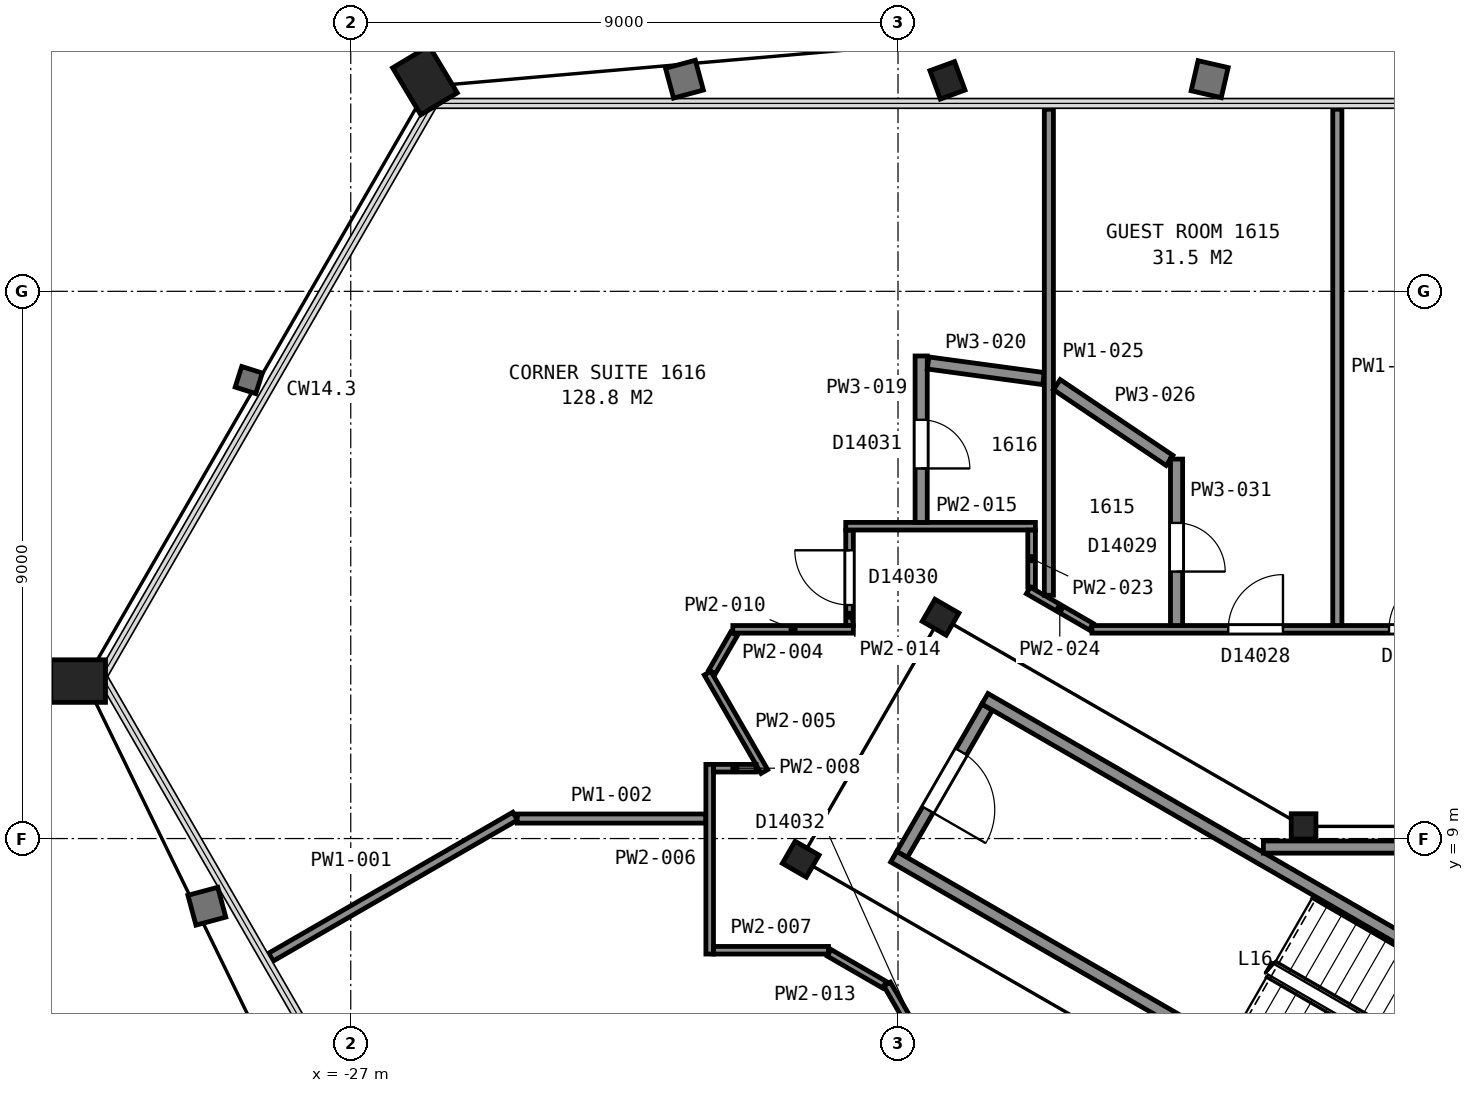
"""IFC4 building model, lengths in metres.
Left out: names, types, materials, properties, quantities, classifications, styles, units other than length and angle.
Written with IfcOpenShell. Run it as: python <this file> out.ifc"""

import sys

from ifc_helpers import new_model, si_unit, direction, frame, frame_2d, origin, origin_2d, place, context, subcontext, project, spatial, rectangle, hollow_rectangle, i_section, extrude, element, fill, save


model = new_model("IFC4")
c1 = context("Model", 3, precision=1e-05, world=origin(), true_north=direction((0.0, 1.0)))
c2 = subcontext(c1, "Body", "Model", "MODEL_VIEW")
j1 = project(units=[si_unit("LENGTHUNIT", "METRE"), si_unit("PLANEANGLEUNIT", "RADIAN")], contexts=[c1])
p1 = place(None, origin())
s1 = spatial("IfcSite", under=j1, at=p1, CompositionType="ELEMENT")
p2 = place(p1, origin())
s2 = spatial("IfcBuilding", under=s1, at=p2, CompositionType="ELEMENT")
p3 = place(p2, frame((0.0, 0.0, 72.8)))
s3 = spatial("IfcBuildingStorey", under=s2, at=p3, CompositionType="ELEMENT", Elevation=72.8)
p4 = place(p3, frame((-17.151, 21.372, 0.025), z_axis=(-0.030414757347, 0.083024067354, 0.996083303131), x_axis=(0.999533369763, -0.000291044086, 0.030544361571)))
e1 = element("IfcColumn", 1, at=p4, inside=s3, PredefinedType="COLUMN", context=c2, shape_type="SweptSolid", body=[
    extrude(i_section(OverallWidth=0.432, OverallDepth=0.498, WebThickness=0.056, FlangeThickness=0.089, FilletRadius=0.015, at=origin_2d()), origin(), (0.0, 0.0, 1.0), 3.564),
])
p5 = place(p3, frame((-25.722, 21.373, 0.04), z_axis=(-0.049772291919, 0.082976830634, 0.995307773774), x_axis=(0.499550777014, 0.86500147592, -0.047132449981)))
e2 = element("IfcColumn", 2, at=p5, inside=s3, PredefinedType="COLUMN", context=c2, shape_type="SweptSolid", body=[
    extrude(hollow_rectangle(XDim=0.7, YDim=0.9, WallThickness=0.065, at=origin_2d()), origin(), (0.0, 0.0, 1.0), 3.537),
])
p6 = place(p3, frame((-31.374, 11.59, 0.04), z_axis=(-0.094046562862, 0.0, 0.995567799808), x_axis=(0.499442771107, 0.865061250551, 0.047179987117)))
e3 = element("IfcColumn", 3, at=p6, inside=s3, PredefinedType="COLUMN", context=c2, shape_type="SweptSolid", body=[
    extrude(hollow_rectangle(XDim=0.7, YDim=0.9, WallThickness=0.065, at=origin_2d()), origin(), (0.0, 0.0, 1.0), 3.536),
])
p7 = place(p3, frame((-11.33, 9.2, 0.0), z_axis=(0.0, 0.0, 1.0), x_axis=(1.0, 0.0, 0.0)))
e4 = element("IfcColumn", 4, at=p7, inside=s3, PredefinedType="COLUMN", context=c2, shape_type="SweptSolid", body=[
    extrude(i_section(OverallWidth=0.406, OverallDepth=0.417, WebThickness=0.03, FlangeThickness=0.048, FilletRadius=0.015, at=origin_2d()), origin(), (0.0, 0.0, 1.0), 3.6),
])
for number, where, z_axis, x_axis in (
    (5, (-17.3, 12.64, 0.0), (0.0, 0.0, 1.0), (0.5, 0.866, 0.0)),
    (6, (-19.6, 8.66, 0.0), (0.0, 0.0, 1.0), (0.5, 0.866, 0.0)),
):
    element("IfcColumn", number, at=place(p3, frame(where, z_axis=z_axis, x_axis=x_axis)), inside=s3, PredefinedType="COLUMN", context=c2, shape_type="SweptSolid", body=[
        extrude(i_section(OverallWidth=0.419, OverallDepth=0.455, WebThickness=0.042, FlangeThickness=0.068, FilletRadius=0.015, at=origin_2d()), origin(), (0.0, 0.0, 1.0), 3.6),
    ])
p8 = place(p3, frame((-16.534, 11.162, 0.0), z_axis=(0.0, 0.0, 1.0), x_axis=(-0.49998411664, -0.866034573852, 0.0)))
e7 = element("IfcWall", 7, at=p8, inside=s3, PredefinedType="PARTITIONING", context=c2, shape_type="SweptSolid", body=[
    extrude(rectangle(XDim=2.8, YDim=0.2, at=frame_2d((1.4, 0.0))), origin(), (0.0, 0.0, 1.0), 3.35),
])
p9 = place(p8, frame((0.85, 0.0, 0.0)))
e8 = element("IfcOpeningElement", 8, at=p9, cuts=e7, PredefinedType="OPENING", context=c2, shape_type="SweptSolid", body=[
    extrude(rectangle(XDim=1.1, YDim=2.1, at=frame_2d((0.55, 1.05))), frame((0.0, 0.11, 0.0), z_axis=(0.0, -1.0, 0.0), x_axis=(1.0, 0.0, 0.0)), (0.0, 0.0, 1.0), 0.22),
])
for number, where, z_axis, x_axis in (
    (9, (-7.678, 2.701, 0.0), (0.0, 0.0, 1.0), (-0.866, 0.5, 0.0)),
    (10, (-6.178, 5.299, 0.0), (0.0, 0.0, 1.0), (-0.866, 0.5, 0.0)),
):
    element("IfcWall", number, at=place(p3, frame(where, z_axis=z_axis, x_axis=x_axis)), inside=s3, PredefinedType="PARTITIONING", context=c2, shape_type="SweptSolid", body=[
        extrude(rectangle(XDim=12.0, YDim=0.2, at=frame_2d((6.0, 0.0))), origin(), (0.0, 0.0, 1.0), 3.35),
    ])
p10 = place(p3, frame((0.263, 8.86, 0.0), z_axis=(0.0, 0.0, 1.0), x_axis=(-1.0, 0.0, 0.0)))
e11 = element("IfcWall", 11, at=p10, inside=s3, PredefinedType="PARTITIONING", context=c2, shape_type="SweptSolid", body=[
    extrude(rectangle(XDim=12.254, YDim=0.2, at=frame_2d((6.127, 0.0))), origin(), (0.0, 0.0, 1.0), 3.35),
])
p11 = place(p10, frame((5.709, 0.0, 0.0)))
e12 = element("IfcOpeningElement", 12, at=p11, cuts=e11, PredefinedType="OPENING", context=c2, shape_type="SweptSolid", body=[
    extrude(rectangle(XDim=1.8, YDim=2.1, at=frame_2d((0.9, 1.05))), frame((0.0, 0.11, 0.0), z_axis=(0.0, -1.0, 0.0), x_axis=(1.0, 0.0, 0.0)), (0.0, 0.0, 1.0), 0.22),
])
p12 = place(p3, frame((-28.313, 7.05, 0.0), z_axis=(0.0, 0.0, 1.0), x_axis=(0.866076865069, 0.499910855846, 0.0)))
e13 = element("IfcWall", 13, at=p12, inside=s3, PredefinedType="PARTITIONING", context=c2, shape_type="SweptSolid", body=[
    extrude(rectangle(XDim=4.636, YDim=0.15, at=frame_2d((2.318, 0.0))), origin(), (0.0, 0.0, 1.0), 2.613),
])
p13 = place(p3, frame((-24.262, 9.329, 0.0), z_axis=(0.0, 0.0, 1.0), x_axis=(1.0, 0.0, 0.0)))
e14 = element("IfcWall", 14, at=p13, inside=s3, PredefinedType="PARTITIONING", context=c2, shape_type="SweptSolid", body=[
    extrude(rectangle(XDim=3.103, YDim=0.15, at=frame_2d((1.551, 0.0))), origin(), (0.0, 0.0, 1.0), 2.613),
])
p14 = place(p3, frame((-21.059, 11.741, 0.0), z_axis=(0.0, 0.0, 1.0), x_axis=(0.500238258503, 0.865887801468, 0.0)))
e15 = element("IfcWall", 15, at=p14, inside=s3, PredefinedType="PARTITIONING", context=c2, shape_type="SweptSolid", body=[
    extrude(rectangle(XDim=0.724, YDim=0.125, at=frame_2d((0.362, 0.0))), origin(), (0.0, 0.0, 1.0), 2.613),
])
p15 = place(p3, frame((-21.132, 11.721, 0.0), z_axis=(0.0, 0.0, 1.0), x_axis=(0.500072997275, -0.865983254686, 0.0)))
e16 = element("IfcWall", 16, at=p15, inside=s3, PredefinedType="PARTITIONING", context=c2, shape_type="SweptSolid", body=[
    extrude(rectangle(XDim=1.869, YDim=0.125, at=frame_2d((0.935, 0.0))), origin(), (0.0, 0.0, 1.0), 2.613),
])
p16 = place(p3, frame((-21.097, 7.101, 0.0), z_axis=(0.0, 0.0, 1.0), x_axis=(0.0, 1.0, 0.0)))
e17 = element("IfcWall", 17, at=p16, inside=s3, PredefinedType="PARTITIONING", context=c2, shape_type="SweptSolid", body=[
    extrude(rectangle(XDim=3.119, YDim=0.125, at=frame_2d((1.56, 0.0))), origin(), (0.0, 0.0, 1.0), 2.613),
])
p17 = place(p3, frame((-21.032, 7.163, 0.0), z_axis=(0.0, 0.0, 1.0), x_axis=(1.0, 0.0, 0.0)))
e18 = element("IfcWall", 18, at=p17, inside=s3, PredefinedType="PARTITIONING", context=c2, shape_type="SweptSolid", body=[
    extrude(rectangle(XDim=1.888, YDim=0.125, at=frame_2d((0.944, 0.0))), origin(), (0.0, 0.0, 1.0), 2.613),
])
p18 = place(p3, frame((-21.032, 10.157, 0.0), z_axis=(0.0, 0.0, 1.0), x_axis=(1.0, 0.0, 0.0)))
e19 = element("IfcWall", 19, at=p18, inside=s3, PredefinedType="PARTITIONING", context=c2, shape_type="SweptSolid", body=[
    extrude(rectangle(XDim=0.698, YDim=0.125, at=frame_2d((0.349, 0.0))), origin(), (0.0, 0.0, 1.0), 2.613),
])
p19 = place(p3, frame((-20.717, 12.441, 0.0), z_axis=(0.0, 0.0, 1.0), x_axis=(1.0, 0.0, 0.0)))
e20 = element("IfcWall", 20, at=p19, inside=s3, PredefinedType="PARTITIONING", context=c2, shape_type="SweptSolid", body=[
    extrude(rectangle(XDim=1.982, YDim=0.125, at=frame_2d((0.991, 0.0))), origin(), (0.0, 0.0, 1.0), 2.613),
])
p20 = place(p3, frame((-19.132, 7.121, 0.0), z_axis=(0.0, 0.0, 1.0), x_axis=(0.865876245925, -0.500258260045, 0.0)))
e21 = element("IfcWall", 21, at=p20, inside=s3, PredefinedType="PARTITIONING", context=c2, shape_type="SweptSolid", body=[
    extrude(rectangle(XDim=1.052, YDim=0.125, at=frame_2d((0.526, 0.0))), origin(), (0.0, 0.0, 1.0), 2.613),
])
p21 = place(p3, frame((-18.797, 12.506, 0.0), z_axis=(0.0, 0.0, 1.0), x_axis=(0.0, 1.0, 0.0)))
e22 = element("IfcWall", 22, at=p21, inside=s3, PredefinedType="PARTITIONING", context=c2, shape_type="SweptSolid", body=[
    extrude(rectangle(XDim=1.566, YDim=0.125, at=frame_2d((0.783, 0.0))), origin(), (0.0, 0.0, 1.0), 2.613),
])
p22 = place(p21, frame((0.335, 0.0, 0.0)))
e23 = element("IfcOpeningElement", 23, at=p22, cuts=e22, PredefinedType="OPENING", context=c2, shape_type="SweptSolid", body=[
    extrude(rectangle(XDim=0.9, YDim=2.1, at=frame_2d((0.45, 1.05))), frame((0.0, 0.073, 0.0), z_axis=(0.0, -1.0, 0.0), x_axis=(1.0, 0.0, 0.0)), (0.0, 0.0, 1.0), 0.145),
])
p23 = place(p3, frame((-18.86, 14.137, 0.0), z_axis=(0.0, 0.0, 1.0), x_axis=(1.0, 0.0, 0.0)))
e24 = element("IfcWall", 24, at=p23, inside=s3, PredefinedType="PARTITIONING", context=c2, shape_type="SweptSolid", body=[
    extrude(rectangle(XDim=3.119, YDim=0.125, at=frame_2d((1.56, 0.0))), origin(), (0.0, 0.0, 1.0), 2.613),
])
p24 = place(p3, frame((-3.766, -18.358, 0.0), z_axis=(0.0, 0.0, 1.0), x_axis=(-0.500003973642, 0.866023109589, 0.0)))
e25 = element("IfcWall", 25, at=p24, inside=s3, PredefinedType="PARTITIONING", context=c2, shape_type="SweptSolid", body=[
    extrude(rectangle(XDim=28.826, YDim=0.125, at=frame_2d((14.413, 0.0))), origin(), (0.0, 0.0, 1.0), 2.613),
])
p25 = place(p24, frame((27.114, 0.0, 0.0)))
e26 = element("IfcOpeningElement", 26, at=p25, cuts=e25, PredefinedType="OPENING", context=c2, shape_type="SweptSolid", body=[
    extrude(rectangle(XDim=0.9, YDim=2.1, at=frame_2d((0.45, 1.05))), frame((0.0, 0.073, 0.0), z_axis=(0.0, -1.0, 0.0), x_axis=(1.0, 0.0, 0.0)), (0.0, 0.0, 1.0), 0.145),
])
p26 = place(p24, frame((20.322, 0.0, 0.0)))
e27 = element("IfcOpeningElement", 27, at=p26, cuts=e25, PredefinedType="OPENING", context=c2, shape_type="SweptSolid", body=[
    extrude(rectangle(XDim=0.9, YDim=2.1, at=frame_2d((0.45, 1.05))), frame((0.0, 0.073, 0.0), z_axis=(0.0, -1.0, 0.0), x_axis=(1.0, 0.0, 0.0)), (0.0, 0.0, 1.0), 0.145),
])
p27 = place(p24, frame((17.68, 0.0, 0.0)))
e28 = element("IfcOpeningElement", 28, at=p27, cuts=e25, PredefinedType="OPENING", context=c2, shape_type="SweptSolid", body=[
    extrude(rectangle(XDim=0.9, YDim=2.1, at=frame_2d((0.45, 1.05))), frame((0.0, 0.073, 0.0), z_axis=(0.0, -1.0, 0.0), x_axis=(1.0, 0.0, 0.0)), (0.0, 0.0, 1.0), 0.145),
])
p28 = place(p24, frame((10.836, 0.0, 0.0)))
e29 = element("IfcOpeningElement", 29, at=p28, cuts=e25, PredefinedType="OPENING", context=c2, shape_type="SweptSolid", body=[
    extrude(rectangle(XDim=0.9, YDim=2.1, at=frame_2d((0.45, 1.05))), frame((0.0, 0.073, 0.0), z_axis=(0.0, -1.0, 0.0), x_axis=(1.0, 0.0, 0.0)), (0.0, 0.0, 1.0), 0.145),
])
p29 = place(p24, frame((7.342, 0.0, 0.0)))
e30 = element("IfcOpeningElement", 30, at=p29, cuts=e25, PredefinedType="OPENING", context=c2, shape_type="SweptSolid", body=[
    extrude(rectangle(XDim=0.9, YDim=2.1, at=frame_2d((0.45, 1.05))), frame((0.0, 0.073, 0.0), z_axis=(0.0, -1.0, 0.0), x_axis=(1.0, 0.0, 0.0)), (0.0, 0.0, 1.0), 0.145),
])
p30 = place(p3, frame((-17.619, 16.937, 0.0), z_axis=(0.0, 0.0, 1.0), x_axis=(0.0, -1.0, 0.0)))
e31 = element("IfcWall", 31, at=p30, inside=s3, PredefinedType="PARTITIONING", context=c2, shape_type="SweptSolid", body=[
    extrude(rectangle(XDim=2.738, YDim=0.2, at=frame_2d((1.369, 0.0))), origin(), (0.0, 0.0, 1.0), 2.613),
])
p31 = place(p30, frame((1.05, 0.0, 0.0)))
e32 = element("IfcOpeningElement", 32, at=p31, cuts=e31, PredefinedType="OPENING", context=c2, shape_type="SweptSolid", body=[
    extrude(rectangle(XDim=0.8, YDim=2.1, at=frame_2d((0.4, 1.05))), frame((0.0, 0.11, 0.0), z_axis=(0.0, -1.0, 0.0), x_axis=(1.0, 0.0, 0.0)), (0.0, 0.0, 1.0), 0.22),
])
p32 = place(p3, frame((-17.505, 16.822, 0.0), z_axis=(0.0, 0.0, 1.0), x_axis=(0.990982367401, -0.133992341199, 0.0)))
e33 = element("IfcWall", 33, at=p32, inside=s3, PredefinedType="PARTITIONING", context=c2, shape_type="SweptSolid", body=[
    extrude(rectangle(XDim=1.915, YDim=0.2, at=frame_2d((0.958, 0.0))), origin(), (0.0, 0.0, 1.0), 2.613),
])
p33 = place(p3, frame((-15.803, 13.135, 0.0), z_axis=(0.0, 0.0, 1.0), x_axis=(0.0, 1.0, 0.0)))
e34 = element("IfcWall", 34, at=p33, inside=s3, PredefinedType="PARTITIONING", context=c2, shape_type="SweptSolid", body=[
    extrude(rectangle(XDim=0.937, YDim=0.125, at=frame_2d((0.469, 0.0))), origin(), (0.0, 0.0, 1.0), 2.613),
])
p34 = place(p3, frame((-15.857, 13.081, 0.0), z_axis=(0.0, 0.0, 1.0), x_axis=(0.866035997947, -0.499981649923, 0.0)))
e35 = element("IfcWall", 35, at=p34, inside=s3, PredefinedType="PARTITIONING", context=c2, shape_type="SweptSolid", body=[
    extrude(rectangle(XDim=1.196, YDim=0.125, at=frame_2d((0.598, 0.0))), origin(), (0.0, 0.0, 1.0), 2.613),
])
p35 = place(p3, frame((-15.519, 13.001, 0.0), z_axis=(0.0, 0.0, 1.0), x_axis=(0.0, 1.0, 0.0)))
e36 = element("IfcWall", 36, at=p35, inside=s3, PredefinedType="PARTITIONING", context=c2, shape_type="SweptSolid", body=[
    extrude(rectangle(XDim=7.994, YDim=0.15, at=frame_2d((3.997, 0.0))), origin(), (0.0, 0.0, 1.0), 2.613),
])
p36 = place(p3, frame((-15.388, 16.465, 0.0), z_axis=(0.0, 0.0, 1.0), x_axis=(0.82987399284, -0.557950854474, 0.0)))
e37 = element("IfcWall", 37, at=p36, inside=s3, PredefinedType="PARTITIONING", context=c2, shape_type="SweptSolid", body=[
    extrude(rectangle(XDim=2.233, YDim=0.2, at=frame_2d((1.116, 0.0))), origin(), (0.0, 0.0, 1.0), 2.613),
])
p37 = place(p3, frame((-14.811, 12.441, 0.0), z_axis=(0.0, 0.0, 1.0), x_axis=(1.0, 0.0, 0.0)))
e38 = element("IfcWall", 38, at=p37, inside=s3, PredefinedType="PARTITIONING", context=c2, shape_type="SweptSolid", body=[
    extrude(rectangle(XDim=29.621, YDim=0.125, at=frame_2d((14.811, 0.0))), origin(), (0.0, 0.0, 1.0), 2.613),
])
p38 = place(p37, frame((25.326, 0.0, 0.0)))
e39 = element("IfcOpeningElement", 39, at=p38, cuts=e38, PredefinedType="OPENING", context=c2, shape_type="SweptSolid", body=[
    extrude(rectangle(XDim=0.9, YDim=2.1, at=frame_2d((0.45, 1.05))), frame((0.0, 0.073, 0.0), z_axis=(0.0, -1.0, 0.0), x_axis=(1.0, 0.0, 0.0)), (0.0, 0.0, 1.0), 0.145),
])
p39 = place(p37, frame((21.833, 0.0, 0.0)))
e40 = element("IfcOpeningElement", 40, at=p39, cuts=e38, PredefinedType="OPENING", context=c2, shape_type="SweptSolid", body=[
    extrude(rectangle(XDim=0.9, YDim=2.1, at=frame_2d((0.45, 1.05))), frame((0.0, 0.073, 0.0), z_axis=(0.0, -1.0, 0.0), x_axis=(1.0, 0.0, 0.0)), (0.0, 0.0, 1.0), 0.145),
])
p40 = place(p37, frame((14.99, 0.0, 0.0)))
e41 = element("IfcOpeningElement", 41, at=p40, cuts=e38, PredefinedType="OPENING", context=c2, shape_type="SweptSolid", body=[
    extrude(rectangle(XDim=0.9, YDim=2.1, at=frame_2d((0.45, 1.05))), frame((0.0, 0.073, 0.0), z_axis=(0.0, -1.0, 0.0), x_axis=(1.0, 0.0, 0.0)), (0.0, 0.0, 1.0), 0.145),
])
p41 = place(p37, frame((12.128, 0.0, 0.0)))
e42 = element("IfcOpeningElement", 42, at=p41, cuts=e38, PredefinedType="OPENING", context=c2, shape_type="SweptSolid", body=[
    extrude(rectangle(XDim=0.9, YDim=2.1, at=frame_2d((0.45, 1.05))), frame((0.0, 0.073, 0.0), z_axis=(0.0, -1.0, 0.0), x_axis=(1.0, 0.0, 0.0)), (0.0, 0.0, 1.0), 0.145),
])
p42 = place(p37, frame((4.885, 0.0, 0.0)))
e43 = element("IfcOpeningElement", 43, at=p42, cuts=e38, PredefinedType="OPENING", context=c2, shape_type="SweptSolid", body=[
    extrude(rectangle(XDim=0.9, YDim=2.1, at=frame_2d((0.45, 1.05))), frame((0.0, 0.073, 0.0), z_axis=(0.0, -1.0, 0.0), x_axis=(1.0, 0.0, 0.0)), (0.0, 0.0, 1.0), 0.145),
])
p43 = place(p37, frame((2.241, 0.0, 0.0)))
e44 = element("IfcOpeningElement", 44, at=p43, cuts=e38, PredefinedType="OPENING", context=c2, shape_type="SweptSolid", body=[
    extrude(rectangle(XDim=0.9, YDim=2.1, at=frame_2d((0.45, 1.05))), frame((0.0, 0.073, 0.0), z_axis=(0.0, -1.0, 0.0), x_axis=(1.0, 0.0, 0.0)), (0.0, 0.0, 1.0), 0.145),
])
p44 = place(p3, frame((-13.419, 12.503, 0.0), z_axis=(0.0, 0.0, 1.0), x_axis=(0.0, 1.0, 0.0)))
e45 = element("IfcWall", 45, at=p44, inside=s3, PredefinedType="PARTITIONING", context=c2, shape_type="SweptSolid", body=[
    extrude(rectangle(XDim=2.738, YDim=0.2, at=frame_2d((1.369, 0.0))), origin(), (0.0, 0.0, 1.0), 2.613),
])
p45 = place(p44, frame((0.887, 0.0, 0.0)))
e46 = element("IfcOpeningElement", 46, at=p45, cuts=e45, PredefinedType="OPENING", context=c2, shape_type="SweptSolid", body=[
    extrude(rectangle(XDim=0.8, YDim=2.1, at=frame_2d((0.4, 1.05))), frame((0.0, 0.11, 0.0), z_axis=(0.0, -1.0, 0.0), x_axis=(1.0, 0.0, 0.0)), (0.0, 0.0, 1.0), 0.22),
])
p46 = place(p3, frame((-10.775, 12.503, 0.0), z_axis=(0.0, 0.0, 1.0), x_axis=(0.0, 1.0, 0.0)))
e47 = element("IfcWall", 47, at=p46, inside=s3, PredefinedType="PARTITIONING", context=c2, shape_type="SweptSolid", body=[
    extrude(rectangle(XDim=8.492, YDim=0.15, at=frame_2d((4.246, 0.0))), origin(), (0.0, 0.0, 1.0), 2.613),
])
p47 = place(p9, origin())
e48 = element("IfcDoor", 48, at=p47, inside=s3, OperationType="SINGLE_SWING_RIGHT", PredefinedType="DOOR", context=c2, shape_type="SweptSolid", body=[
    extrude(rectangle(XDim=1.1, YDim=2.1, at=frame_2d((0.55, 1.05))), frame((0.0, 0.025, 0.0), z_axis=(0.0, -1.0, 0.0), x_axis=(1.0, 0.0, 0.0)), (0.0, 0.0, 1.0), 0.05),
])
fill(e8, e48)
p48 = place(p22, origin())
e49 = element("IfcDoor", 49, at=p48, inside=s3, OperationType="SINGLE_SWING_RIGHT", PredefinedType="DOOR", context=c2, shape_type="SweptSolid", body=[
    extrude(rectangle(XDim=0.9, YDim=2.1, at=frame_2d((0.45, 1.05))), frame((0.0, 0.025, 0.0), z_axis=(0.0, -1.0, 0.0), x_axis=(1.0, 0.0, 0.0)), (0.0, 0.0, 1.0), 0.05),
])
fill(e23, e49)
p49 = place(p31, origin())
e50 = element("IfcDoor", 50, at=p49, inside=s3, OperationType="SINGLE_SWING_RIGHT", PredefinedType="DOOR", context=c2, shape_type="SweptSolid", body=[
    extrude(rectangle(XDim=0.8, YDim=2.1, at=frame_2d((0.4, 1.05))), frame((0.0, 0.025, 0.0), z_axis=(0.0, -1.0, 0.0), x_axis=(1.0, 0.0, 0.0)), (0.0, 0.0, 1.0), 0.05),
])
fill(e32, e50)
p50 = place(p42, origin())
e51 = element("IfcDoor", 51, at=p50, inside=s3, OperationType="SINGLE_SWING_RIGHT", PredefinedType="DOOR", context=c2, shape_type="SweptSolid", body=[
    extrude(rectangle(XDim=0.9, YDim=2.1, at=frame_2d((0.45, 1.05))), frame((0.0, 0.025, 0.0), z_axis=(0.0, -1.0, 0.0), x_axis=(1.0, 0.0, 0.0)), (0.0, 0.0, 1.0), 0.05),
])
fill(e43, e51)
p51 = place(p43, origin())
e52 = element("IfcDoor", 52, at=p51, inside=s3, OperationType="SINGLE_SWING_RIGHT", PredefinedType="DOOR", context=c2, shape_type="SweptSolid", body=[
    extrude(rectangle(XDim=0.9, YDim=2.1, at=frame_2d((0.45, 1.05))), frame((0.0, 0.025, 0.0), z_axis=(0.0, -1.0, 0.0), x_axis=(1.0, 0.0, 0.0)), (0.0, 0.0, 1.0), 0.05),
])
fill(e44, e52)
p52 = place(p45, origin())
e53 = element("IfcDoor", 53, at=p52, inside=s3, OperationType="SINGLE_SWING_LEFT", PredefinedType="DOOR", context=c2, shape_type="SweptSolid", body=[
    extrude(rectangle(XDim=0.8, YDim=2.1, at=frame_2d((0.4, 1.05))), frame((0.0, 0.025, 0.0), z_axis=(0.0, -1.0, 0.0), x_axis=(1.0, 0.0, 0.0)), (0.0, 0.0, 1.0), 0.05),
])
fill(e46, e53)
save(model, sys.argv[1])
